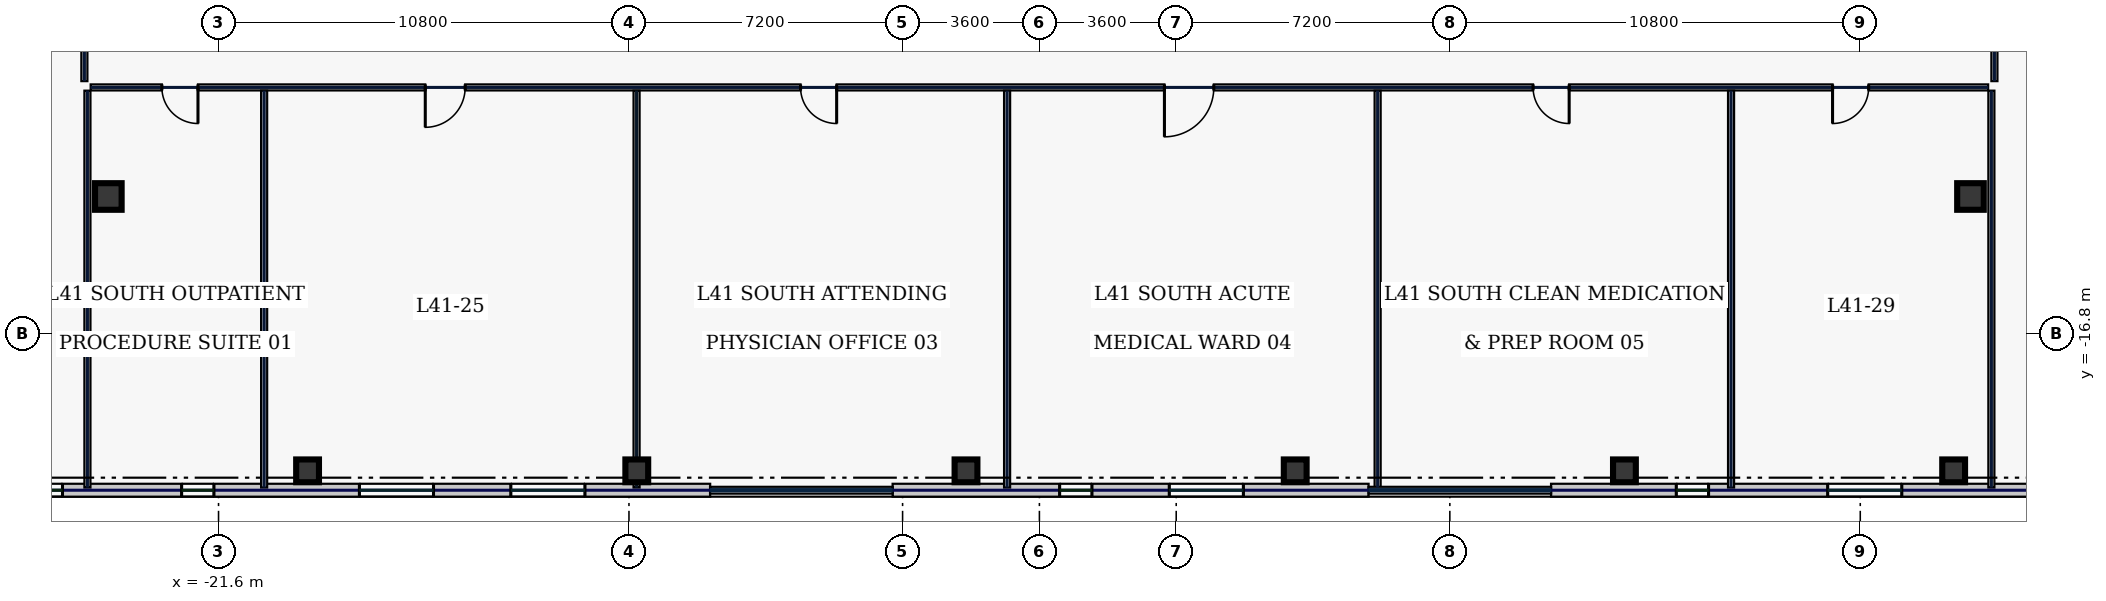
"""IFC4 building model, lengths in metres.
Left out: names, types, materials, properties, quantities, classifications, styles, units other than length and angle.
Written with IfcOpenShell. Run it as: python <this file> out.ifc"""

import sys

from ifc_helpers import new_model, si_unit, direction, frame, frame_2d, origin, origin_2d, place, context, subcontext, project, spatial, rectangle, hollow_rectangle, extrude, element, fill, save


model = new_model("IFC4")
c1 = context("Model", 3, precision=1e-05, world=origin(), true_north=direction((0.0, 1.0)))
c2 = subcontext(c1, "Body", "Model", "MODEL_VIEW")
j1 = project(units=[si_unit("LENGTHUNIT", "METRE"), si_unit("PLANEANGLEUNIT", "RADIAN")], contexts=[c1])
p1 = place(None, origin())
s1 = spatial("IfcSite", under=j1, at=p1, CompositionType="ELEMENT")
p2 = place(p1, origin())
s2 = spatial("IfcBuilding", under=s1, at=p2, CompositionType="ELEMENT")
p3 = place(p2, frame((0.0, 0.0, 180.2)))
s3 = spatial("IfcBuildingStorey", under=s2, at=p3, CompositionType="ELEMENT", Elevation=180.2)
for number, where, z_axis, x_axis in (
    (1, (-24.5, -13.2, 0.0), (0.0, 0.0, 1.0), (1.0, 0.0, 0.0)),
    (2, (24.5, -13.2, 0.0), (0.0, 0.0, 1.0), (1.0, 0.0, 0.0)),
):
    element("IfcColumn", number, at=place(p3, frame(where, z_axis=z_axis, x_axis=x_axis)), inside=s3, PredefinedType="COLUMN", context=c2, shape_type="SweptSolid", body=[
        extrude(hollow_rectangle(XDim=0.7, YDim=0.7, WallThickness=0.032, at=origin_2d()), origin(), (0.0, 0.0, 1.0), 3.74),
    ])
for number, where, z_axis, x_axis in (
    (3, (-19.257, -20.42, 0.0), (0.0, 0.0, 1.0), (1.0, 0.0, 0.0)),
    (4, (-10.594, -20.42, 0.0), (0.0, 0.0, 1.0), (1.0, 0.0, 0.0)),
    (5, (-1.931, -20.42, 0.0), (0.0, 0.0, 1.0), (1.0, 0.0, 0.0)),
    (6, (6.731, -20.42, 0.0), (0.0, 0.0, 1.0), (1.0, 0.0, 0.0)),
    (7, (15.394, -20.42, 0.0), (0.0, 0.0, 1.0), (1.0, 0.0, 0.0)),
    (8, (24.057, -20.42, 0.0), (0.0, 0.0, 1.0), (1.0, 0.0, 0.0)),
):
    element("IfcColumn", number, at=place(p3, frame(where, z_axis=z_axis, x_axis=x_axis)), inside=s3, PredefinedType="COLUMN", context=c2, shape_type="SweptSolid", body=[
        extrude(hollow_rectangle(XDim=0.6, YDim=0.6, WallThickness=0.028, at=origin_2d()), origin(), (0.0, 0.0, 1.0), 3.74),
    ])
p4 = place(p3, frame((-28.6, -20.93, 0.0), z_axis=(0.0, 0.0, 1.0), x_axis=(1.0, 0.0, 0.0)))
e9 = element("IfcWall", 9, at=p4, inside=s3, PredefinedType="STANDARD", context=c2, shape_type="SweptSolid", body=[
    extrude(rectangle(XDim=19.937, YDim=0.34, at=frame_2d((9.969, 0.0))), origin(), (0.0, 0.0, 1.0), 3.74),
])
p5 = place(p4, frame((2.044, 0.0, 0.8)))
e10 = element("IfcOpeningElement", 10, at=p5, cuts=e9, PredefinedType="OPENING", context=c2, shape_type="SweptSolid", body=[
    extrude(rectangle(XDim=0.85, YDim=1.85, at=frame_2d((0.425, 0.925))), frame((0.0, 0.18, 0.0), z_axis=(0.0, -1.0, 0.0), x_axis=(1.0, 0.0, 0.0)), (0.0, 0.0, 1.0), 0.36),
])
p6 = place(p4, frame((6.029, 0.0, 0.8)))
e11 = element("IfcOpeningElement", 11, at=p6, cuts=e9, PredefinedType="OPENING", context=c2, shape_type="SweptSolid", body=[
    extrude(rectangle(XDim=0.85, YDim=1.85, at=frame_2d((0.425, 0.925))), frame((0.0, 0.18, 0.0), z_axis=(0.0, -1.0, 0.0), x_axis=(1.0, 0.0, 0.0)), (0.0, 0.0, 1.0), 0.36),
])
p7 = place(p4, frame((10.707, 0.0, 0.8)))
e12 = element("IfcOpeningElement", 12, at=p7, cuts=e9, PredefinedType="OPENING", context=c2, shape_type="SweptSolid", body=[
    extrude(rectangle(XDim=1.95, YDim=2.1, at=frame_2d((0.975, 1.05))), frame((0.0, 0.18, 0.0), z_axis=(0.0, -1.0, 0.0), x_axis=(1.0, 0.0, 0.0)), (0.0, 0.0, 1.0), 0.36),
])
p8 = place(p4, frame((14.692, 0.0, 0.8)))
e13 = element("IfcOpeningElement", 13, at=p8, cuts=e9, PredefinedType="OPENING", context=c2, shape_type="SweptSolid", body=[
    extrude(rectangle(XDim=1.95, YDim=2.1, at=frame_2d((0.975, 1.05))), frame((0.0, 0.18, 0.0), z_axis=(0.0, -1.0, 0.0), x_axis=(1.0, 0.0, 0.0)), (0.0, 0.0, 1.0), 0.36),
])
p9 = place(p3, frame((-3.863, -20.93, 0.0), z_axis=(0.0, 0.0, 1.0), x_axis=(1.0, 0.0, 0.0)))
e14 = element("IfcWall", 14, at=p9, inside=s3, PredefinedType="STANDARD", context=c2, shape_type="SweptSolid", body=[
    extrude(rectangle(XDim=12.526, YDim=0.34, at=frame_2d((6.263, 0.0))), origin(), (0.0, 0.0, 1.0), 3.74),
])
p10 = place(p9, frame((4.396, 0.0, 0.8)))
e15 = element("IfcOpeningElement", 15, at=p10, cuts=e14, PredefinedType="OPENING", context=c2, shape_type="SweptSolid", body=[
    extrude(rectangle(XDim=0.85, YDim=1.85, at=frame_2d((0.425, 0.925))), frame((0.0, 0.18, 0.0), z_axis=(0.0, -1.0, 0.0), x_axis=(1.0, 0.0, 0.0)), (0.0, 0.0, 1.0), 0.36),
])
p11 = place(p9, frame((7.28, 0.0, 0.8)))
e16 = element("IfcOpeningElement", 16, at=p11, cuts=e14, PredefinedType="OPENING", context=c2, shape_type="SweptSolid", body=[
    extrude(rectangle(XDim=1.95, YDim=2.1, at=frame_2d((0.975, 1.05))), frame((0.0, 0.18, 0.0), z_axis=(0.0, -1.0, 0.0), x_axis=(1.0, 0.0, 0.0)), (0.0, 0.0, 1.0), 0.36),
])
p12 = place(p3, frame((13.463, -20.93, 0.0), z_axis=(0.0, 0.0, 1.0), x_axis=(1.0, 0.0, 0.0)))
e17 = element("IfcWall", 17, at=p12, inside=s3, PredefinedType="STANDARD", context=c2, shape_type="SweptSolid", body=[
    extrude(rectangle(XDim=19.937, YDim=0.34, at=frame_2d((9.969, 0.0))), origin(), (0.0, 0.0, 1.0), 3.74),
])
p13 = place(p12, frame((3.295, 0.0, 0.8)))
e18 = element("IfcOpeningElement", 18, at=p13, cuts=e17, PredefinedType="OPENING", context=c2, shape_type="SweptSolid", body=[
    extrude(rectangle(XDim=0.85, YDim=1.85, at=frame_2d((0.425, 0.925))), frame((0.0, 0.18, 0.0), z_axis=(0.0, -1.0, 0.0), x_axis=(1.0, 0.0, 0.0)), (0.0, 0.0, 1.0), 0.36),
])
p14 = place(p12, frame((7.28, 0.0, 0.8)))
e19 = element("IfcOpeningElement", 19, at=p14, cuts=e17, PredefinedType="OPENING", context=c2, shape_type="SweptSolid", body=[
    extrude(rectangle(XDim=1.95, YDim=2.1, at=frame_2d((0.975, 1.05))), frame((0.0, 0.18, 0.0), z_axis=(0.0, -1.0, 0.0), x_axis=(1.0, 0.0, 0.0)), (0.0, 0.0, 1.0), 0.36),
])
p15 = place(p12, frame((13.058, 0.0, 0.8)))
e20 = element("IfcOpeningElement", 20, at=p15, cuts=e17, PredefinedType="OPENING", context=c2, shape_type="SweptSolid", body=[
    extrude(rectangle(XDim=0.85, YDim=1.85, at=frame_2d((0.425, 0.925))), frame((0.0, 0.18, 0.0), z_axis=(0.0, -1.0, 0.0), x_axis=(1.0, 0.0, 0.0)), (0.0, 0.0, 1.0), 0.36),
])
p16 = place(p12, frame((15.943, 0.0, 0.8)))
e21 = element("IfcOpeningElement", 21, at=p16, cuts=e17, PredefinedType="OPENING", context=c2, shape_type="SweptSolid", body=[
    extrude(rectangle(XDim=1.95, YDim=2.1, at=frame_2d((0.975, 1.05))), frame((0.0, 0.18, 0.0), z_axis=(0.0, -1.0, 0.0), x_axis=(1.0, 0.0, 0.0)), (0.0, 0.0, 1.0), 0.36),
])
p17 = place(p3, frame((-25.13, -10.165, 0.0), z_axis=(0.0, 0.0, 1.0), x_axis=(0.0, 1.0, 0.0)))
e22 = element("IfcWall", 22, at=p17, inside=s3, PredefinedType="PARTITIONING", context=c2, shape_type="SweptSolid", body=[
    extrude(rectangle(XDim=2.98, YDim=0.16, at=frame_2d((1.49, 0.0))), origin(), (0.0, 0.0, 1.0), 3.74),
])
p18 = place(p17, frame((1.1, 0.0, 0.0)))
e23 = element("IfcOpeningElement", 23, at=p18, cuts=e22, PredefinedType="OPENING", context=c2, shape_type="SweptSolid", body=[
    extrude(rectangle(XDim=0.95, YDim=2.2, at=frame_2d((0.475, 1.1))), frame((0.0, 0.09, 0.0), z_axis=(0.0, -1.0, 0.0), x_axis=(1.0, 0.0, 0.0)), (0.0, 0.0, 1.0), 0.18),
])
p19 = place(p3, frame((25.13, -7.185, 0.0), z_axis=(0.0, 0.0, 1.0), x_axis=(0.0, -1.0, 0.0)))
e24 = element("IfcWall", 24, at=p19, inside=s3, PredefinedType="PARTITIONING", context=c2, shape_type="SweptSolid", body=[
    extrude(rectangle(XDim=2.98, YDim=0.16, at=frame_2d((1.49, 0.0))), origin(), (0.0, 0.0, 1.0), 3.74),
])
p20 = place(p19, frame((1.1, 0.0, 0.0)))
e25 = element("IfcOpeningElement", 25, at=p20, cuts=e24, PredefinedType="OPENING", context=c2, shape_type="SweptSolid", body=[
    extrude(rectangle(XDim=0.95, YDim=2.2, at=frame_2d((0.475, 1.1))), frame((0.0, 0.09, 0.0), z_axis=(0.0, -1.0, 0.0), x_axis=(1.0, 0.0, 0.0)), (0.0, 0.0, 1.0), 0.18),
])
p21 = place(p3, frame((24.965, -10.33, 0.0), z_axis=(0.0, 0.0, 1.0), x_axis=(-1.0, 0.0, 0.0)))
e26 = element("IfcWall", 26, at=p21, inside=s3, PredefinedType="PARTITIONING", context=c2, shape_type="SweptSolid", body=[
    extrude(rectangle(XDim=49.93, YDim=0.16, at=frame_2d((24.965, 0.0))), origin(), (0.0, 0.0, 1.0), 3.74),
])
p22 = place(p21, frame((47.106, 0.0, 0.0)))
e27 = element("IfcOpeningElement", 27, at=p22, cuts=e26, PredefinedType="OPENING", context=c2, shape_type="SweptSolid", body=[
    extrude(rectangle(XDim=0.95, YDim=2.2, at=frame_2d((0.475, 1.1))), frame((0.0, 0.09, 0.0), z_axis=(0.0, -1.0, 0.0), x_axis=(1.0, 0.0, 0.0)), (0.0, 0.0, 1.0), 0.18),
])
p23 = place(p21, frame((40.075, 0.0, 0.0)))
e28 = element("IfcOpeningElement", 28, at=p23, cuts=e26, PredefinedType="OPENING", context=c2, shape_type="SweptSolid", body=[
    extrude(rectangle(XDim=1.05, YDim=2.2, at=frame_2d((0.525, 1.1))), frame((0.0, 0.09, 0.0), z_axis=(0.0, -1.0, 0.0), x_axis=(1.0, 0.0, 0.0)), (0.0, 0.0, 1.0), 0.18),
])
p24 = place(p21, frame((30.3, 0.0, 0.0)))
e29 = element("IfcOpeningElement", 29, at=p24, cuts=e26, PredefinedType="OPENING", context=c2, shape_type="SweptSolid", body=[
    extrude(rectangle(XDim=0.95, YDim=2.2, at=frame_2d((0.475, 1.1))), frame((0.0, 0.09, 0.0), z_axis=(0.0, -1.0, 0.0), x_axis=(1.0, 0.0, 0.0)), (0.0, 0.0, 1.0), 0.18),
])
p25 = place(p21, frame((20.375, 0.0, 0.0)))
e30 = element("IfcOpeningElement", 30, at=p25, cuts=e26, PredefinedType="OPENING", context=c2, shape_type="SweptSolid", body=[
    extrude(rectangle(XDim=1.3, YDim=2.2, at=frame_2d((0.65, 1.1))), frame((0.0, 0.09, 0.0), z_axis=(0.0, -1.0, 0.0), x_axis=(1.0, 0.0, 0.0)), (0.0, 0.0, 1.0), 0.18),
])
p26 = place(p21, frame((11.025, 0.0, 0.0)))
e31 = element("IfcOpeningElement", 31, at=p26, cuts=e26, PredefinedType="OPENING", context=c2, shape_type="SweptSolid", body=[
    extrude(rectangle(XDim=0.95, YDim=2.2, at=frame_2d((0.475, 1.1))), frame((0.0, 0.09, 0.0), z_axis=(0.0, -1.0, 0.0), x_axis=(1.0, 0.0, 0.0)), (0.0, 0.0, 1.0), 0.18),
])
p27 = place(p21, frame((3.144, 0.0, 0.0)))
e32 = element("IfcOpeningElement", 32, at=p27, cuts=e26, PredefinedType="OPENING", context=c2, shape_type="SweptSolid", body=[
    extrude(rectangle(XDim=0.95, YDim=2.2, at=frame_2d((0.475, 1.1))), frame((0.0, 0.09, 0.0), z_axis=(0.0, -1.0, 0.0), x_axis=(1.0, 0.0, 0.0)), (0.0, 0.0, 1.0), 0.18),
])
for number, where, z_axis, x_axis in (
    (33, (-25.05, -20.86, 0.0), (0.0, 0.0, 1.0), (0.0, 1.0, 0.0)),
    (34, (25.05, -20.86, 0.0), (0.0, 0.0, 1.0), (0.0, 1.0, 0.0)),
    (35, (-20.4, -20.86, 0.0), (0.0, 0.0, 1.0), (0.0, 1.0, 0.0)),
):
    element("IfcWall", number, at=place(p3, frame(where, z_axis=z_axis, x_axis=x_axis)), inside=s3, PredefinedType="PARTITIONING", context=c2, shape_type="SweptSolid", body=[
        extrude(rectangle(XDim=10.445, YDim=0.16, at=frame_2d((5.223, 0.0))), origin(), (0.0, 0.0, 1.0), 3.74),
    ])
p28 = place(p3, frame((-10.6, -20.86, 0.0), z_axis=(0.0, 0.0, 1.0), x_axis=(0.0, 1.0, 0.0)))
e36 = element("IfcWall", 36, at=p28, inside=s3, PredefinedType="PARTITIONING", context=c2, shape_type="SweptSolid", body=[
    extrude(rectangle(XDim=10.445, YDim=0.16, at=frame_2d((5.223, 0.0))), origin(), (0.0, 0.0, 1.0), 3.285),
])
for number, where, z_axis, x_axis in (
    (37, (-0.85, -20.86, 0.0), (0.0, 0.0, 1.0), (0.0, 1.0, 0.0)),
    (38, (8.9, -20.86, 0.0), (0.0, 0.0, 1.0), (0.0, 1.0, 0.0)),
    (39, (18.2, -20.86, 0.0), (0.0, 0.0, 1.0), (0.0, 1.0, 0.0)),
):
    element("IfcWall", number, at=place(p3, frame(where, z_axis=z_axis, x_axis=x_axis)), inside=s3, PredefinedType="PARTITIONING", context=c2, shape_type="SweptSolid", body=[
        extrude(rectangle(XDim=10.445, YDim=0.16, at=frame_2d((5.223, 0.0))), origin(), (0.0, 0.0, 1.0), 3.74),
    ])
p29 = place(p5, origin())
e40 = element("IfcWindow", 40, at=p29, inside=s3, PartitioningType="SINGLE_PANEL", PredefinedType="WINDOW", context=c2, shape_type="SweptSolid", body=[
    extrude(rectangle(XDim=0.85, YDim=1.85, at=frame_2d((0.425, 0.925))), frame((0.0, 0.03, 0.0), z_axis=(0.0, -1.0, 0.0), x_axis=(1.0, 0.0, 0.0)), (0.0, 0.0, 1.0), 0.06),
])
fill(e10, e40)
p30 = place(p6, origin())
e41 = element("IfcWindow", 41, at=p30, inside=s3, PartitioningType="SINGLE_PANEL", PredefinedType="WINDOW", context=c2, shape_type="SweptSolid", body=[
    extrude(rectangle(XDim=0.85, YDim=1.85, at=frame_2d((0.425, 0.925))), frame((0.0, 0.03, 0.0), z_axis=(0.0, -1.0, 0.0), x_axis=(1.0, 0.0, 0.0)), (0.0, 0.0, 1.0), 0.06),
])
fill(e11, e41)
p31 = place(p7, origin())
e42 = element("IfcWindow", 42, at=p31, inside=s3, PartitioningType="SINGLE_PANEL", PredefinedType="WINDOW", context=c2, shape_type="SweptSolid", body=[
    extrude(rectangle(XDim=1.95, YDim=2.1, at=frame_2d((0.975, 1.05))), frame((0.0, 0.03, 0.0), z_axis=(0.0, -1.0, 0.0), x_axis=(1.0, 0.0, 0.0)), (0.0, 0.0, 1.0), 0.06),
])
fill(e12, e42)
p32 = place(p8, origin())
e43 = element("IfcWindow", 43, at=p32, inside=s3, PartitioningType="SINGLE_PANEL", PredefinedType="WINDOW", context=c2, shape_type="SweptSolid", body=[
    extrude(rectangle(XDim=1.95, YDim=2.1, at=frame_2d((0.975, 1.05))), frame((0.0, 0.03, 0.0), z_axis=(0.0, -1.0, 0.0), x_axis=(1.0, 0.0, 0.0)), (0.0, 0.0, 1.0), 0.06),
])
fill(e13, e43)
p33 = place(p10, origin())
e44 = element("IfcWindow", 44, at=p33, inside=s3, PartitioningType="SINGLE_PANEL", PredefinedType="WINDOW", context=c2, shape_type="SweptSolid", body=[
    extrude(rectangle(XDim=0.85, YDim=1.85, at=frame_2d((0.425, 0.925))), frame((0.0, 0.03, 0.0), z_axis=(0.0, -1.0, 0.0), x_axis=(1.0, 0.0, 0.0)), (0.0, 0.0, 1.0), 0.06),
])
fill(e15, e44)
p34 = place(p11, origin())
e45 = element("IfcWindow", 45, at=p34, inside=s3, PartitioningType="SINGLE_PANEL", PredefinedType="WINDOW", context=c2, shape_type="SweptSolid", body=[
    extrude(rectangle(XDim=1.95, YDim=2.1, at=frame_2d((0.975, 1.05))), frame((0.0, 0.03, 0.0), z_axis=(0.0, -1.0, 0.0), x_axis=(1.0, 0.0, 0.0)), (0.0, 0.0, 1.0), 0.06),
])
fill(e16, e45)
p35 = place(p13, origin())
e46 = element("IfcWindow", 46, at=p35, inside=s3, PartitioningType="SINGLE_PANEL", PredefinedType="WINDOW", context=c2, shape_type="SweptSolid", body=[
    extrude(rectangle(XDim=0.85, YDim=1.85, at=frame_2d((0.425, 0.925))), frame((0.0, 0.03, 0.0), z_axis=(0.0, -1.0, 0.0), x_axis=(1.0, 0.0, 0.0)), (0.0, 0.0, 1.0), 0.06),
])
fill(e18, e46)
p36 = place(p14, origin())
e47 = element("IfcWindow", 47, at=p36, inside=s3, PartitioningType="SINGLE_PANEL", PredefinedType="WINDOW", context=c2, shape_type="SweptSolid", body=[
    extrude(rectangle(XDim=1.95, YDim=2.1, at=frame_2d((0.975, 1.05))), frame((0.0, 0.03, 0.0), z_axis=(0.0, -1.0, 0.0), x_axis=(1.0, 0.0, 0.0)), (0.0, 0.0, 1.0), 0.06),
])
fill(e19, e47)
p37 = place(p22, origin())
e48 = element("IfcDoor", 48, at=p37, inside=s3, OperationType="SINGLE_SWING_LEFT", PredefinedType="DOOR", context=c2, shape_type="SweptSolid", body=[
    extrude(rectangle(XDim=0.95, YDim=2.2, at=frame_2d((0.475, 1.1))), frame((0.0, 0.025, 0.0), z_axis=(0.0, -1.0, 0.0), x_axis=(1.0, 0.0, 0.0)), (0.0, 0.0, 1.0), 0.05),
])
fill(e27, e48)
p38 = place(p23, origin())
e49 = element("IfcDoor", 49, at=p38, inside=s3, OperationType="SINGLE_SWING_RIGHT", PredefinedType="DOOR", context=c2, shape_type="SweptSolid", body=[
    extrude(rectangle(XDim=1.05, YDim=2.2, at=frame_2d((0.525, 1.1))), frame((0.0, 0.025, 0.0), z_axis=(0.0, -1.0, 0.0), x_axis=(1.0, 0.0, 0.0)), (0.0, 0.0, 1.0), 0.05),
])
fill(e28, e49)
p39 = place(p24, origin())
e50 = element("IfcDoor", 50, at=p39, inside=s3, OperationType="SINGLE_SWING_LEFT", PredefinedType="DOOR", context=c2, shape_type="SweptSolid", body=[
    extrude(rectangle(XDim=0.95, YDim=2.2, at=frame_2d((0.475, 1.1))), frame((0.0, 0.025, 0.0), z_axis=(0.0, -1.0, 0.0), x_axis=(1.0, 0.0, 0.0)), (0.0, 0.0, 1.0), 0.05),
])
fill(e29, e50)
p40 = place(p25, origin())
e51 = element("IfcDoor", 51, at=p40, inside=s3, OperationType="SINGLE_SWING_RIGHT", PredefinedType="DOOR", context=c2, shape_type="SweptSolid", body=[
    extrude(rectangle(XDim=1.3, YDim=2.2, at=frame_2d((0.65, 1.1))), frame((0.0, 0.025, 0.0), z_axis=(0.0, -1.0, 0.0), x_axis=(1.0, 0.0, 0.0)), (0.0, 0.0, 1.0), 0.05),
])
fill(e30, e51)
p41 = place(p26, origin())
e52 = element("IfcDoor", 52, at=p41, inside=s3, OperationType="SINGLE_SWING_LEFT", PredefinedType="DOOR", context=c2, shape_type="SweptSolid", body=[
    extrude(rectangle(XDim=0.95, YDim=2.2, at=frame_2d((0.475, 1.1))), frame((0.0, 0.025, 0.0), z_axis=(0.0, -1.0, 0.0), x_axis=(1.0, 0.0, 0.0)), (0.0, 0.0, 1.0), 0.05),
])
fill(e31, e52)
p42 = place(p27, origin())
e53 = element("IfcDoor", 53, at=p42, inside=s3, OperationType="SINGLE_SWING_RIGHT", PredefinedType="DOOR", context=c2, shape_type="SweptSolid", body=[
    extrude(rectangle(XDim=0.95, YDim=2.2, at=frame_2d((0.475, 1.1))), frame((0.0, 0.025, 0.0), z_axis=(0.0, -1.0, 0.0), x_axis=(1.0, 0.0, 0.0)), (0.0, 0.0, 1.0), 0.05),
])
fill(e32, e53)
save(model, sys.argv[1])
